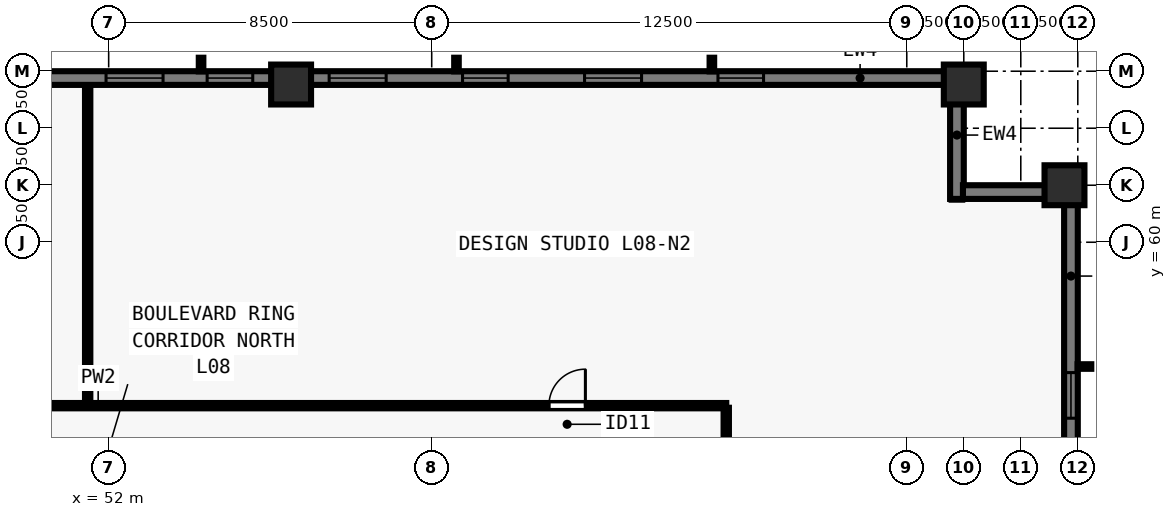
"""IFC4 building model, lengths in metres.
Left out: names, types, materials, properties, quantities, classifications, styles, units other than length and angle.
Written with IfcOpenShell. Run it as: python <this file> out.ifc"""

import sys

from ifc_helpers import new_model, si_unit, direction, frame, frame_2d, origin, origin_2d, place, context, subcontext, project, spatial, rectangle, extrude, element, fill, save


model = new_model("IFC4")
c1 = context("Model", 3, precision=1e-05, world=origin(), true_north=direction((0.0, 1.0)))
c2 = subcontext(c1, "Body", "Model", "MODEL_VIEW")
j1 = project(units=[si_unit("LENGTHUNIT", "METRE"), si_unit("PLANEANGLEUNIT", "RADIAN")], contexts=[c1])
p1 = place(None, origin())
s1 = spatial("IfcSite", under=j1, at=p1, CompositionType="ELEMENT")
p2 = place(p1, origin())
s2 = spatial("IfcBuilding", under=s1, at=p2, CompositionType="ELEMENT")
p3 = place(p2, frame((0.0, 0.0, 34.0)))
s3 = spatial("IfcBuildingStorey", under=s2, at=p3, CompositionType="ELEMENT", Elevation=34.0)
for number, where, z_axis, x_axis in (
    (1, (77.15, 61.5, 0.0), (0.0, 0.0, 1.0), (0.0, 1.0, 0.0)),
    (2, (74.5, 64.15, 0.0), (0.0, 0.0, 1.0), (1.0, 0.0, 0.0)),
    (3, (56.8, 64.15, 0.0), (0.0, 0.0, 1.0), (1.0, 0.0, 0.0)),
):
    element("IfcColumn", number, at=place(p3, frame(where, z_axis=z_axis, x_axis=x_axis)), inside=s3, PredefinedType="COLUMN", context=c2, shape_type="SweptSolid", body=[
        extrude(rectangle(XDim=1.05, YDim=1.05, at=origin_2d()), origin(), (0.0, 0.0, 1.0), 3.5),
    ])
p4 = place(p3, frame((29.5, 64.32, 0.0), z_axis=(0.0, 0.0, 1.0), x_axis=(1.0, 0.0, 0.0)))
e4 = element("IfcWall", 4, at=p4, inside=s3, PredefinedType="SOLIDWALL", context=c2, shape_type="SweptSolid", body=[
    extrude(rectangle(XDim=44.662, YDim=0.36, at=frame_2d((22.331, 0.0))), origin(), (0.0, 0.0, 1.0), 3.28),
])
p5 = place(p4, frame((4.93, 0.0, 0.8)))
e5 = element("IfcOpeningElement", 5, at=p5, cuts=e4, PredefinedType="OPENING", context=c2, shape_type="SweptSolid", body=[
    extrude(rectangle(XDim=1.2, YDim=1.544, at=frame_2d((0.6, 0.772))), frame((0.0, 0.19, 0.0), z_axis=(0.0, -1.0, 0.0), x_axis=(1.0, 0.0, 0.0)), (0.0, 0.0, 1.0), 0.38),
])
p6 = place(p4, frame((8.14, 0.0, 0.8)))
e6 = element("IfcOpeningElement", 6, at=p6, cuts=e4, PredefinedType="OPENING", context=c2, shape_type="SweptSolid", body=[
    extrude(rectangle(XDim=1.5, YDim=1.544, at=frame_2d((0.75, 0.772))), frame((0.0, 0.19, 0.0), z_axis=(0.0, -1.0, 0.0), x_axis=(1.0, 0.0, 0.0)), (0.0, 0.0, 1.0), 0.38),
])
p7 = place(p4, frame((11.65, 0.0, 0.8)))
e7 = element("IfcOpeningElement", 7, at=p7, cuts=e4, PredefinedType="OPENING", context=c2, shape_type="SweptSolid", body=[
    extrude(rectangle(XDim=1.2, YDim=1.544, at=frame_2d((0.6, 0.772))), frame((0.0, 0.19, 0.0), z_axis=(0.0, -1.0, 0.0), x_axis=(1.0, 0.0, 0.0)), (0.0, 0.0, 1.0), 0.38),
])
p8 = place(p4, frame((14.861, 0.0, 0.8)))
e8 = element("IfcOpeningElement", 8, at=p8, cuts=e4, PredefinedType="OPENING", context=c2, shape_type="SweptSolid", body=[
    extrude(rectangle(XDim=1.5, YDim=1.544, at=frame_2d((0.75, 0.772))), frame((0.0, 0.19, 0.0), z_axis=(0.0, -1.0, 0.0), x_axis=(1.0, 0.0, 0.0)), (0.0, 0.0, 1.0), 0.38),
])
p9 = place(p4, frame((18.821, 0.0, 0.8)))
e9 = element("IfcOpeningElement", 9, at=p9, cuts=e4, PredefinedType="OPENING", context=c2, shape_type="SweptSolid", body=[
    extrude(rectangle(XDim=1.2, YDim=1.544, at=frame_2d((0.6, 0.772))), frame((0.0, 0.19, 0.0), z_axis=(0.0, -1.0, 0.0), x_axis=(1.0, 0.0, 0.0)), (0.0, 0.0, 1.0), 0.38),
])
p10 = place(p4, frame((22.431, 0.0, 0.8)))
e10 = element("IfcOpeningElement", 10, at=p10, cuts=e4, PredefinedType="OPENING", context=c2, shape_type="SweptSolid", body=[
    extrude(rectangle(XDim=1.5, YDim=1.544, at=frame_2d((0.75, 0.772))), frame((0.0, 0.19, 0.0), z_axis=(0.0, -1.0, 0.0), x_axis=(1.0, 0.0, 0.0)), (0.0, 0.0, 1.0), 0.38),
])
p11 = place(p4, frame((25.091, 0.0, 0.8)))
e11 = element("IfcOpeningElement", 11, at=p11, cuts=e4, PredefinedType="OPENING", context=c2, shape_type="SweptSolid", body=[
    extrude(rectangle(XDim=1.2, YDim=1.544, at=frame_2d((0.6, 0.772))), frame((0.0, 0.19, 0.0), z_axis=(0.0, -1.0, 0.0), x_axis=(1.0, 0.0, 0.0)), (0.0, 0.0, 1.0), 0.38),
])
p12 = place(p4, frame((28.302, 0.0, 0.8)))
e12 = element("IfcOpeningElement", 12, at=p12, cuts=e4, PredefinedType="OPENING", context=c2, shape_type="SweptSolid", body=[
    extrude(rectangle(XDim=1.5, YDim=1.544, at=frame_2d((0.75, 0.772))), frame((0.0, 0.19, 0.0), z_axis=(0.0, -1.0, 0.0), x_axis=(1.0, 0.0, 0.0)), (0.0, 0.0, 1.0), 0.38),
])
p13 = place(p4, frame((31.812, 0.0, 0.8)))
e13 = element("IfcOpeningElement", 13, at=p13, cuts=e4, PredefinedType="OPENING", context=c2, shape_type="SweptSolid", body=[
    extrude(rectangle(XDim=1.2, YDim=1.544, at=frame_2d((0.6, 0.772))), frame((0.0, 0.19, 0.0), z_axis=(0.0, -1.0, 0.0), x_axis=(1.0, 0.0, 0.0)), (0.0, 0.0, 1.0), 0.38),
])
p14 = place(p4, frame((35.022, 0.0, 0.8)))
e14 = element("IfcOpeningElement", 14, at=p14, cuts=e4, PredefinedType="OPENING", context=c2, shape_type="SweptSolid", body=[
    extrude(rectangle(XDim=1.5, YDim=1.544, at=frame_2d((0.75, 0.772))), frame((0.0, 0.19, 0.0), z_axis=(0.0, -1.0, 0.0), x_axis=(1.0, 0.0, 0.0)), (0.0, 0.0, 1.0), 0.38),
])
p15 = place(p4, frame((38.532, 0.0, 0.8)))
e15 = element("IfcOpeningElement", 15, at=p15, cuts=e4, PredefinedType="OPENING", context=c2, shape_type="SweptSolid", body=[
    extrude(rectangle(XDim=1.2, YDim=1.544, at=frame_2d((0.6, 0.772))), frame((0.0, 0.19, 0.0), z_axis=(0.0, -1.0, 0.0), x_axis=(1.0, 0.0, 0.0)), (0.0, 0.0, 1.0), 0.38),
])
p16 = place(p3, frame((74.32, 64.5, 0.0), z_axis=(0.0, 0.0, 1.0), x_axis=(0.0, -1.0, 0.0)))
e16 = element("IfcWall", 16, at=p16, inside=s3, PredefinedType="SOLIDWALL", context=c2, shape_type="SweptSolid", body=[
    extrude(rectangle(XDim=3.36, YDim=0.36, at=frame_2d((1.68, 0.0))), origin(), (0.0, 0.0, 1.0), 3.28),
])
p17 = place(p3, frame((74.478, 61.32, 0.0), z_axis=(0.0, 0.0, 1.0), x_axis=(1.0, 0.0, 0.0)))
e17 = element("IfcWall", 17, at=p17, inside=s3, PredefinedType="SOLIDWALL", context=c2, shape_type="SweptSolid", body=[
    extrude(rectangle(XDim=2.684, YDim=0.36, at=frame_2d((1.342, 0.0))), origin(), (0.0, 0.0, 1.0), 3.28),
])
p18 = place(p3, frame((77.32, 61.5, 0.0), z_axis=(0.0, 0.0, 1.0), x_axis=(0.0, -1.0, 0.0)))
e18 = element("IfcWall", 18, at=p18, inside=s3, PredefinedType="SOLIDWALL", context=c2, shape_type="SweptSolid", body=[
    extrude(rectangle(XDim=44.662, YDim=0.36, at=frame_2d((22.331, 0.0))), origin(), (0.0, 0.0, 1.0), 3.28),
])
p19 = place(p18, frame((4.93, 0.0, 0.8)))
e19 = element("IfcOpeningElement", 19, at=p19, cuts=e18, PredefinedType="OPENING", context=c2, shape_type="SweptSolid", body=[
    extrude(rectangle(XDim=1.2, YDim=1.544, at=frame_2d((0.6, 0.772))), frame((0.0, 0.19, 0.0), z_axis=(0.0, -1.0, 0.0), x_axis=(1.0, 0.0, 0.0)), (0.0, 0.0, 1.0), 0.38),
])
p20 = place(p18, frame((8.14, 0.0, 0.8)))
e20 = element("IfcOpeningElement", 20, at=p20, cuts=e18, PredefinedType="OPENING", context=c2, shape_type="SweptSolid", body=[
    extrude(rectangle(XDim=1.5, YDim=1.544, at=frame_2d((0.75, 0.772))), frame((0.0, 0.19, 0.0), z_axis=(0.0, -1.0, 0.0), x_axis=(1.0, 0.0, 0.0)), (0.0, 0.0, 1.0), 0.38),
])
p21 = place(p18, frame((11.65, 0.0, 0.8)))
e21 = element("IfcOpeningElement", 21, at=p21, cuts=e18, PredefinedType="OPENING", context=c2, shape_type="SweptSolid", body=[
    extrude(rectangle(XDim=1.2, YDim=1.544, at=frame_2d((0.6, 0.772))), frame((0.0, 0.19, 0.0), z_axis=(0.0, -1.0, 0.0), x_axis=(1.0, 0.0, 0.0)), (0.0, 0.0, 1.0), 0.38),
])
p22 = place(p18, frame((15.311, 0.0, 0.8)))
e22 = element("IfcOpeningElement", 22, at=p22, cuts=e18, PredefinedType="OPENING", context=c2, shape_type="SweptSolid", body=[
    extrude(rectangle(XDim=1.5, YDim=1.544, at=frame_2d((0.75, 0.772))), frame((0.0, 0.19, 0.0), z_axis=(0.0, -1.0, 0.0), x_axis=(1.0, 0.0, 0.0)), (0.0, 0.0, 1.0), 0.38),
])
p23 = place(p18, frame((18.821, 0.0, 0.8)))
e23 = element("IfcOpeningElement", 23, at=p23, cuts=e18, PredefinedType="OPENING", context=c2, shape_type="SweptSolid", body=[
    extrude(rectangle(XDim=1.2, YDim=1.544, at=frame_2d((0.6, 0.772))), frame((0.0, 0.19, 0.0), z_axis=(0.0, -1.0, 0.0), x_axis=(1.0, 0.0, 0.0)), (0.0, 0.0, 1.0), 0.38),
])
p24 = place(p18, frame((20.331, 0.0, 0.8)))
e24 = element("IfcOpeningElement", 24, at=p24, cuts=e18, PredefinedType="OPENING", context=c2, shape_type="SweptSolid", body=[
    extrude(rectangle(XDim=1.5, YDim=1.544, at=frame_2d((0.75, 0.772))), frame((0.0, 0.19, 0.0), z_axis=(0.0, -1.0, 0.0), x_axis=(1.0, 0.0, 0.0)), (0.0, 0.0, 1.0), 0.38),
])
p25 = place(p18, frame((25.091, 0.0, 0.8)))
e25 = element("IfcOpeningElement", 25, at=p25, cuts=e18, PredefinedType="OPENING", context=c2, shape_type="SweptSolid", body=[
    extrude(rectangle(XDim=1.2, YDim=1.544, at=frame_2d((0.6, 0.772))), frame((0.0, 0.19, 0.0), z_axis=(0.0, -1.0, 0.0), x_axis=(1.0, 0.0, 0.0)), (0.0, 0.0, 1.0), 0.38),
])
p26 = place(p18, frame((28.302, 0.0, 0.8)))
e26 = element("IfcOpeningElement", 26, at=p26, cuts=e18, PredefinedType="OPENING", context=c2, shape_type="SweptSolid", body=[
    extrude(rectangle(XDim=1.5, YDim=1.544, at=frame_2d((0.75, 0.772))), frame((0.0, 0.19, 0.0), z_axis=(0.0, -1.0, 0.0), x_axis=(1.0, 0.0, 0.0)), (0.0, 0.0, 1.0), 0.38),
])
p27 = place(p18, frame((31.812, 0.0, 0.8)))
e27 = element("IfcOpeningElement", 27, at=p27, cuts=e18, PredefinedType="OPENING", context=c2, shape_type="SweptSolid", body=[
    extrude(rectangle(XDim=1.2, YDim=1.544, at=frame_2d((0.6, 0.772))), frame((0.0, 0.19, 0.0), z_axis=(0.0, -1.0, 0.0), x_axis=(1.0, 0.0, 0.0)), (0.0, 0.0, 1.0), 0.38),
])
p28 = place(p18, frame((35.022, 0.0, 0.8)))
e28 = element("IfcOpeningElement", 28, at=p28, cuts=e18, PredefinedType="OPENING", context=c2, shape_type="SweptSolid", body=[
    extrude(rectangle(XDim=1.5, YDim=1.544, at=frame_2d((0.75, 0.772))), frame((0.0, 0.19, 0.0), z_axis=(0.0, -1.0, 0.0), x_axis=(1.0, 0.0, 0.0)), (0.0, 0.0, 1.0), 0.38),
])
p29 = place(p18, frame((38.532, 0.0, 0.8)))
e29 = element("IfcOpeningElement", 29, at=p29, cuts=e18, PredefinedType="OPENING", context=c2, shape_type="SweptSolid", body=[
    extrude(rectangle(XDim=1.2, YDim=1.544, at=frame_2d((0.6, 0.772))), frame((0.0, 0.19, 0.0), z_axis=(0.0, -1.0, 0.0), x_axis=(1.0, 0.0, 0.0)), (0.0, 0.0, 1.0), 0.38),
])
p30 = place(p3, frame((35.75, 55.7, 0.0), z_axis=(0.0, 0.0, 1.0), x_axis=(1.0, 0.0, 0.0)))
e30 = element("IfcWall", 30, at=p30, inside=s3, PredefinedType="PARTITIONING", context=c2, shape_type="SweptSolid", body=[
    extrude(rectangle(XDim=32.5, YDim=0.14, at=frame_2d((16.25, 0.0))), origin(), (0.0, 0.0, 1.0), 3.28),
])
p31 = place(p30, frame((3.154, 0.0, 0.0)))
e31 = element("IfcOpeningElement", 31, at=p31, cuts=e30, PredefinedType="OPENING", context=c2, shape_type="SweptSolid", body=[
    extrude(rectangle(XDim=0.96, YDim=2.12, at=frame_2d((0.48, 1.06))), frame((0.0, 0.08, 0.0), z_axis=(0.0, -1.0, 0.0), x_axis=(1.0, 0.0, 0.0)), (0.0, 0.0, 1.0), 0.16),
])
p32 = place(p30, frame((27.834, 0.0, 0.0)))
e32 = element("IfcOpeningElement", 32, at=p32, cuts=e30, PredefinedType="OPENING", context=c2, shape_type="SweptSolid", body=[
    extrude(rectangle(XDim=0.96, YDim=2.12, at=frame_2d((0.48, 1.06))), frame((0.0, 0.08, 0.0), z_axis=(0.0, -1.0, 0.0), x_axis=(1.0, 0.0, 0.0)), (0.0, 0.0, 1.0), 0.16),
])
p33 = place(p3, frame((68.25, 22.355, 0.0), z_axis=(0.0, 0.0, 1.0), x_axis=(0.0, 1.0, 0.0)))
e33 = element("IfcWall", 33, at=p33, inside=s3, PredefinedType="PARTITIONING", context=c2, shape_type="SweptSolid", body=[
    extrude(rectangle(XDim=33.29, YDim=0.14, at=frame_2d((16.645, 0.0))), origin(), (0.0, 0.0, 1.0), 3.28),
])
p34 = place(p33, frame((3.522, 0.0, 0.0)))
e34 = element("IfcOpeningElement", 34, at=p34, cuts=e33, PredefinedType="OPENING", context=c2, shape_type="SweptSolid", body=[
    extrude(rectangle(XDim=0.96, YDim=2.12, at=frame_2d((0.48, 1.06))), frame((0.0, 0.08, 0.0), z_axis=(0.0, -1.0, 0.0), x_axis=(1.0, 0.0, 0.0)), (0.0, 0.0, 1.0), 0.16),
])
p35 = place(p33, frame((11.956, 0.0, 0.0)))
e35 = element("IfcOpeningElement", 35, at=p35, cuts=e33, PredefinedType="OPENING", context=c2, shape_type="SweptSolid", body=[
    extrude(rectangle(XDim=0.96, YDim=2.12, at=frame_2d((0.48, 1.06))), frame((0.0, 0.08, 0.0), z_axis=(0.0, -1.0, 0.0), x_axis=(1.0, 0.0, 0.0)), (0.0, 0.0, 1.0), 0.16),
])
p36 = place(p33, frame((20.256, 0.0, 0.0)))
e36 = element("IfcOpeningElement", 36, at=p36, cuts=e33, PredefinedType="OPENING", context=c2, shape_type="SweptSolid", body=[
    extrude(rectangle(XDim=0.96, YDim=2.12, at=frame_2d((0.48, 1.06))), frame((0.0, 0.08, 0.0), z_axis=(0.0, -1.0, 0.0), x_axis=(1.0, 0.0, 0.0)), (0.0, 0.0, 1.0), 0.16),
])
p37 = place(p33, frame((28.422, 0.0, 0.0)))
e37 = element("IfcOpeningElement", 37, at=p37, cuts=e33, PredefinedType="OPENING", context=c2, shape_type="SweptSolid", body=[
    extrude(rectangle(XDim=0.96, YDim=2.12, at=frame_2d((0.48, 1.06))), frame((0.0, 0.08, 0.0), z_axis=(0.0, -1.0, 0.0), x_axis=(1.0, 0.0, 0.0)), (0.0, 0.0, 1.0), 0.16),
])
p38 = place(p3, frame((51.448, 55.8, 0.0), z_axis=(0.0, 0.0, 1.0), x_axis=(0.0, 1.0, 0.0)))
e38 = element("IfcWall", 38, at=p38, inside=s3, PredefinedType="PARTITIONING", context=c2, shape_type="SweptSolid", body=[
    extrude(rectangle(XDim=8.28, YDim=0.14, at=frame_2d((4.14, 0.0))), origin(), (0.0, 0.0, 1.0), 3.28),
])
p39 = place(p10, origin())
e39 = element("IfcWindow", 39, at=p39, inside=s3, PartitioningType="SINGLE_PANEL", PredefinedType="WINDOW", context=c2, shape_type="SweptSolid", body=[
    extrude(rectangle(XDim=1.5, YDim=1.544, at=frame_2d((0.75, 0.772))), frame((0.0, -0.05, 0.0), z_axis=(0.0, -1.0, 0.0), x_axis=(1.0, 0.0, 0.0)), (0.0, 0.0, 1.0), 0.06),
])
fill(e10, e39)
p40 = place(p11, origin())
e40 = element("IfcWindow", 40, at=p40, inside=s3, PartitioningType="SINGLE_PANEL", PredefinedType="WINDOW", context=c2, shape_type="SweptSolid", body=[
    extrude(rectangle(XDim=1.2, YDim=1.544, at=frame_2d((0.6, 0.772))), frame((0.0, -0.05, 0.0), z_axis=(0.0, -1.0, 0.0), x_axis=(1.0, 0.0, 0.0)), (0.0, 0.0, 1.0), 0.06),
])
fill(e11, e40)
p41 = place(p12, origin())
e41 = element("IfcWindow", 41, at=p41, inside=s3, PartitioningType="SINGLE_PANEL", PredefinedType="WINDOW", context=c2, shape_type="SweptSolid", body=[
    extrude(rectangle(XDim=1.5, YDim=1.544, at=frame_2d((0.75, 0.772))), frame((0.0, -0.05, 0.0), z_axis=(0.0, -1.0, 0.0), x_axis=(1.0, 0.0, 0.0)), (0.0, 0.0, 1.0), 0.06),
])
fill(e12, e41)
p42 = place(p13, origin())
e42 = element("IfcWindow", 42, at=p42, inside=s3, PartitioningType="SINGLE_PANEL", PredefinedType="WINDOW", context=c2, shape_type="SweptSolid", body=[
    extrude(rectangle(XDim=1.2, YDim=1.544, at=frame_2d((0.6, 0.772))), frame((0.0, -0.05, 0.0), z_axis=(0.0, -1.0, 0.0), x_axis=(1.0, 0.0, 0.0)), (0.0, 0.0, 1.0), 0.06),
])
fill(e13, e42)
p43 = place(p14, origin())
e43 = element("IfcWindow", 43, at=p43, inside=s3, PartitioningType="SINGLE_PANEL", PredefinedType="WINDOW", context=c2, shape_type="SweptSolid", body=[
    extrude(rectangle(XDim=1.5, YDim=1.544, at=frame_2d((0.75, 0.772))), frame((0.0, -0.05, 0.0), z_axis=(0.0, -1.0, 0.0), x_axis=(1.0, 0.0, 0.0)), (0.0, 0.0, 1.0), 0.06),
])
fill(e14, e43)
p44 = place(p15, origin())
e44 = element("IfcWindow", 44, at=p44, inside=s3, PartitioningType="SINGLE_PANEL", PredefinedType="WINDOW", context=c2, shape_type="SweptSolid", body=[
    extrude(rectangle(XDim=1.2, YDim=1.544, at=frame_2d((0.6, 0.772))), frame((0.0, -0.05, 0.0), z_axis=(0.0, -1.0, 0.0), x_axis=(1.0, 0.0, 0.0)), (0.0, 0.0, 1.0), 0.06),
])
fill(e15, e44)
p45 = place(p19, origin())
e45 = element("IfcWindow", 45, at=p45, inside=s3, PartitioningType="SINGLE_PANEL", PredefinedType="WINDOW", context=c2, shape_type="SweptSolid", body=[
    extrude(rectangle(XDim=1.2, YDim=1.544, at=frame_2d((0.6, 0.772))), frame((0.0, -0.05, 0.0), z_axis=(0.0, -1.0, 0.0), x_axis=(1.0, 0.0, 0.0)), (0.0, 0.0, 1.0), 0.06),
])
fill(e19, e45)
p46 = place(p32, origin())
e46 = element("IfcDoor", 46, at=p46, inside=s3, OperationType="SINGLE_SWING_RIGHT", PredefinedType="DOOR", context=c2, shape_type="SweptSolid", body=[
    extrude(rectangle(XDim=0.96, YDim=2.12, at=frame_2d((0.48, 1.06))), frame((0.0, 0.025, 0.0), z_axis=(0.0, -1.0, 0.0), x_axis=(1.0, 0.0, 0.0)), (0.0, 0.0, 1.0), 0.05),
])
fill(e32, e46)
save(model, sys.argv[1])
